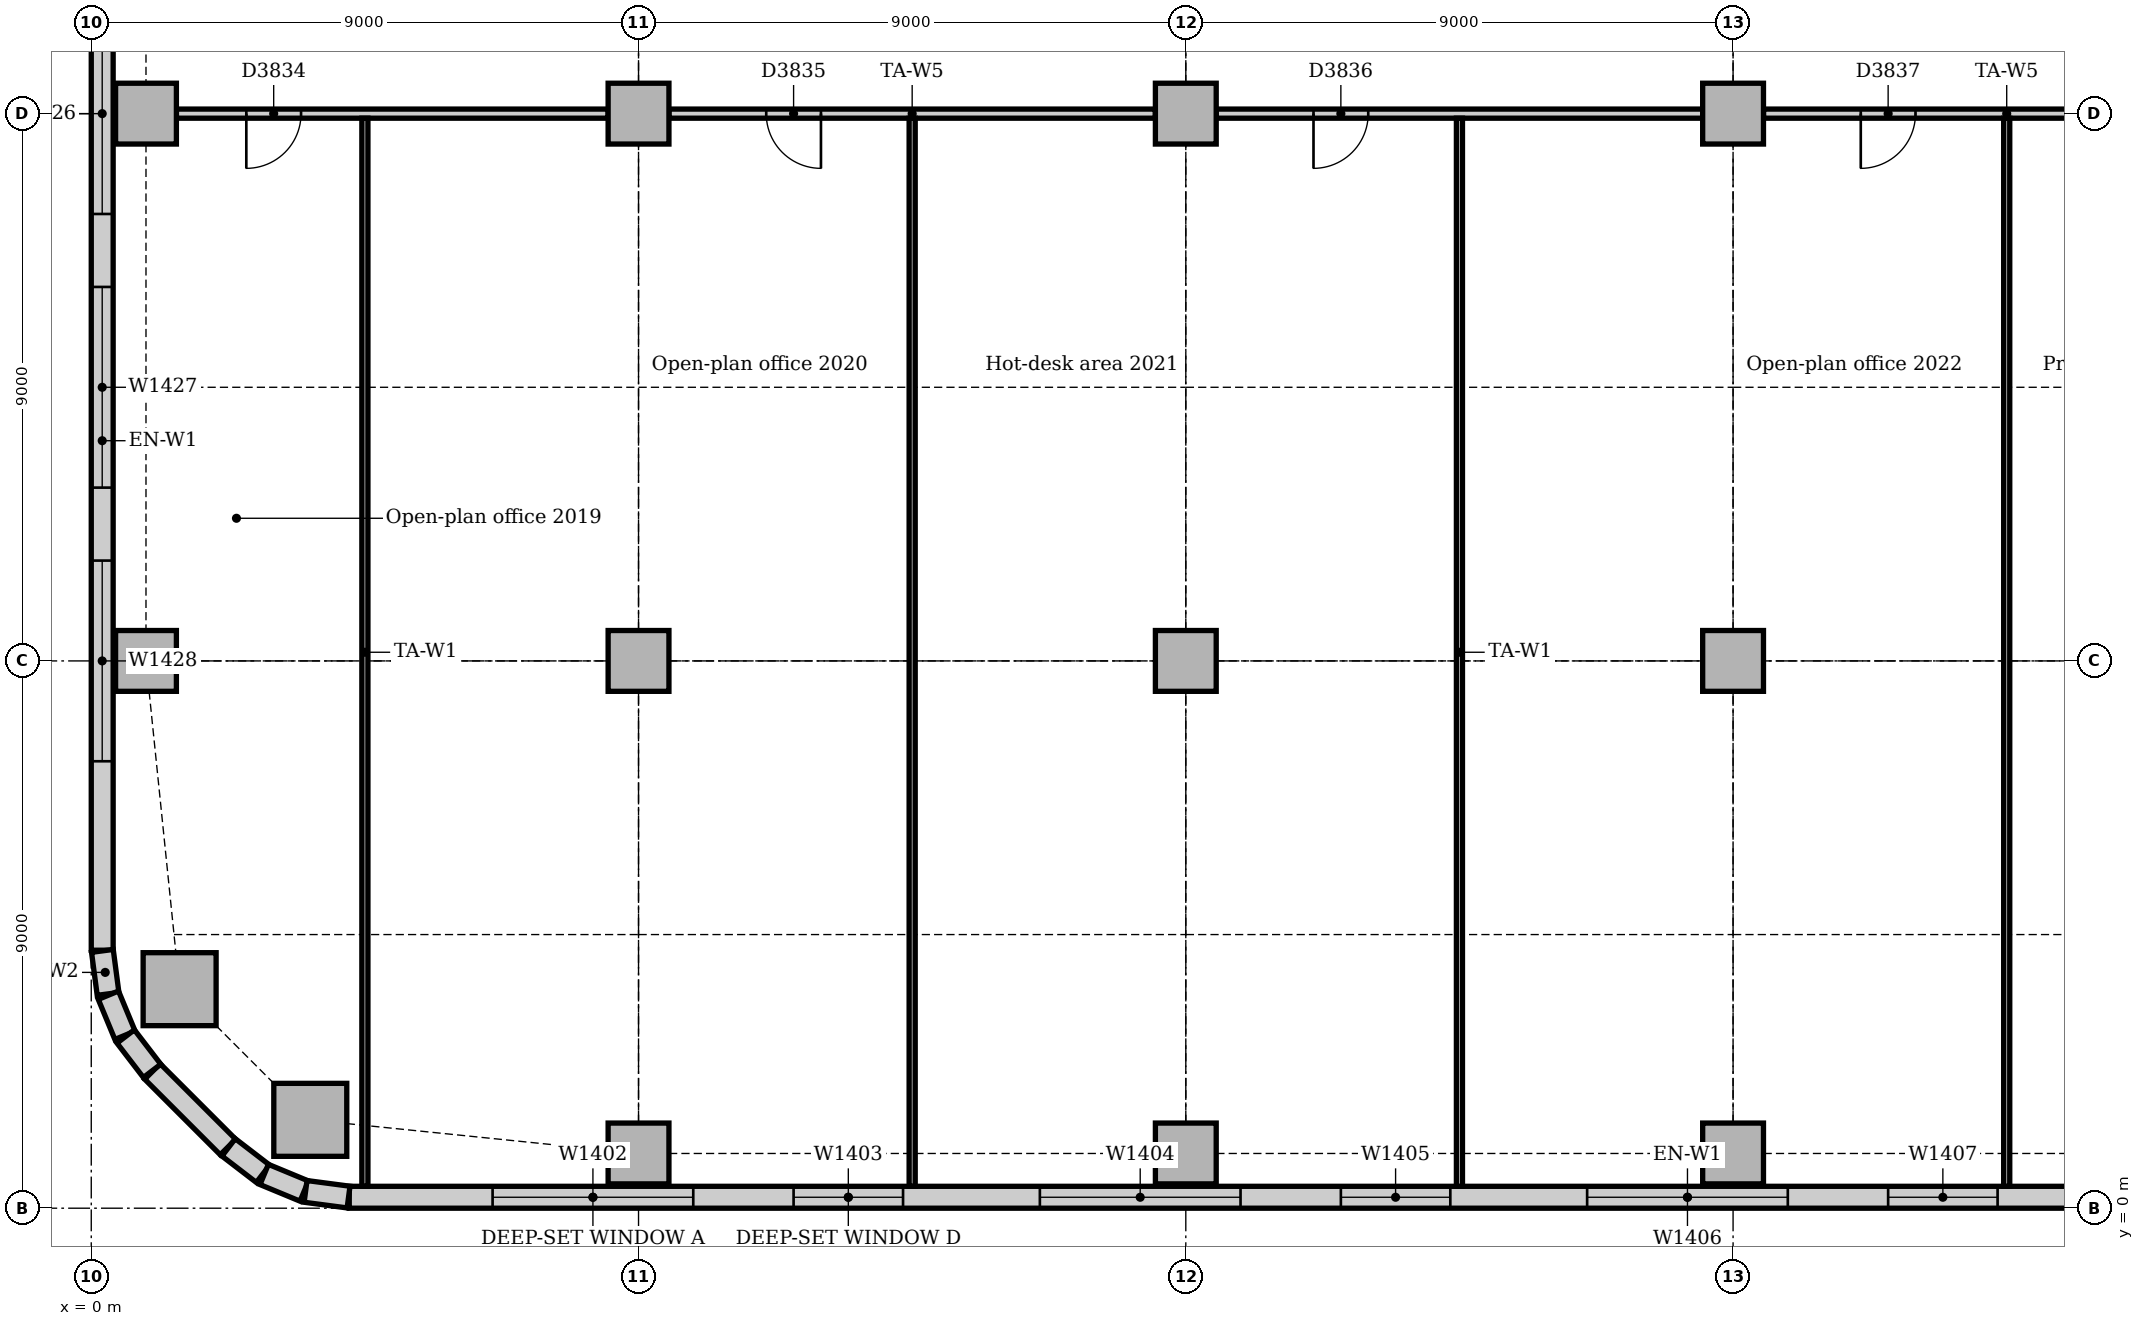
"""IFC4 building model, lengths in metres.
Left out: names, types, materials, properties, quantities, classifications, styles, units other than length and angle.
Written with IfcOpenShell. Run it as: python <this file> out.ifc"""

import sys

from ifc_helpers import new_model, si_unit, direction, frame, frame_2d, origin, origin_2d, place, context, subcontext, project, spatial, rectangle, extrude, element, fill, save


model = new_model("IFC4")
c1 = context("Model", 3, precision=1e-05, world=origin(), true_north=direction((0.0, 1.0)))
c2 = subcontext(c1, "Body", "Model", "MODEL_VIEW")
j1 = project(units=[si_unit("LENGTHUNIT", "METRE"), si_unit("PLANEANGLEUNIT", "RADIAN")], contexts=[c1])
p1 = place(None, origin())
s1 = spatial("IfcSite", under=j1, at=p1, CompositionType="ELEMENT")
p2 = place(p1, origin())
s2 = spatial("IfcBuilding", under=s1, at=p2, CompositionType="ELEMENT")
p3 = place(p2, frame((0.0, 0.0, 87.0)))
s3 = spatial("IfcBuildingStorey", under=s2, at=p3, CompositionType="ELEMENT", Elevation=87.0)
for number, where, z_axis, x_axis in (
    (1, (3.602, 1.453, 0.0), (0.0, 0.0, 1.0), (1.0, 0.0, 0.0)),
    (2, (1.453, 3.602, 0.0), (0.0, 0.0, 1.0), (1.0, 0.0, 0.0)),
):
    element("IfcColumn", number, at=place(p3, frame(where, z_axis=z_axis, x_axis=x_axis)), inside=s3, PredefinedType="COLUMN", context=c2, shape_type="SweptSolid", body=[
        extrude(rectangle(XDim=1.2, YDim=1.2, at=origin_2d()), origin(), (0.0, 0.0, 1.0), 3.85),
    ])
for number, where, z_axis, x_axis in (
    (3, (9.0, 0.9, 0.0), (0.0, 0.0, 1.0), (1.0, 0.0, 0.0)),
    (4, (18.0, 0.9, 0.0), (0.0, 0.0, 1.0), (1.0, 0.0, 0.0)),
    (5, (27.0, 0.9, 0.0), (0.0, 0.0, 1.0), (1.0, 0.0, 0.0)),
    (6, (0.9, 9.0, 0.0), (0.0, 0.0, 1.0), (1.0, 0.0, 0.0)),
    (7, (0.9, 18.0, 0.0), (0.0, 0.0, 1.0), (1.0, 0.0, 0.0)),
    (8, (9.0, 9.0, 0.0), (0.0, 0.0, 1.0), (1.0, 0.0, 0.0)),
    (9, (9.0, 18.0, 0.0), (0.0, 0.0, 1.0), (1.0, 0.0, 0.0)),
    (10, (18.0, 9.0, 0.0), (0.0, 0.0, 1.0), (1.0, 0.0, 0.0)),
    (11, (18.0, 18.0, 0.0), (0.0, 0.0, 1.0), (1.0, 0.0, 0.0)),
    (12, (27.0, 9.0, 0.0), (0.0, 0.0, 1.0), (1.0, 0.0, 0.0)),
    (13, (27.0, 18.0, 0.0), (0.0, 0.0, 1.0), (1.0, 0.0, 0.0)),
):
    element("IfcColumn", number, at=place(p3, frame(where, z_axis=z_axis, x_axis=x_axis)), inside=s3, PredefinedType="COLUMN", context=c2, shape_type="SweptSolid", body=[
        extrude(rectangle(XDim=1.0, YDim=1.0, at=origin_2d()), origin(), (0.0, 0.0, 1.0), 3.85),
    ])
p4 = place(p3, frame((4.243, 0.18, 0.0), z_axis=(0.0, 0.0, 1.0), x_axis=(1.0, 0.0, 0.0)))
e14 = element("IfcWall", 14, at=p4, inside=s3, PredefinedType="STANDARD", context=c2, shape_type="SweptSolid", body=[
    extrude(rectangle(XDim=44.015, YDim=0.36, at=frame_2d((22.007, 0.0))), origin(), (0.0, 0.0, 1.0), 3.85),
])
p5 = place(p4, frame((2.357, 0.0, 0.9)))
e15 = element("IfcOpeningElement", 15, at=p5, cuts=e14, PredefinedType="OPENING", context=c2, shape_type="SweptSolid", body=[
    extrude(rectangle(XDim=3.3, YDim=1.6, at=frame_2d((1.65, 0.8))), frame((0.0, 0.19, 0.0), z_axis=(0.0, -1.0, 0.0), x_axis=(1.0, 0.0, 0.0)), (0.0, 0.0, 1.0), 0.38),
])
p6 = place(p4, frame((7.307, 0.0, 0.9)))
e16 = element("IfcOpeningElement", 16, at=p6, cuts=e14, PredefinedType="OPENING", context=c2, shape_type="SweptSolid", body=[
    extrude(rectangle(XDim=1.8, YDim=1.6, at=frame_2d((0.9, 0.8))), frame((0.0, 0.19, 0.0), z_axis=(0.0, -1.0, 0.0), x_axis=(1.0, 0.0, 0.0)), (0.0, 0.0, 1.0), 0.38),
])
p7 = place(p4, frame((11.357, 0.0, 0.9)))
e17 = element("IfcOpeningElement", 17, at=p7, cuts=e14, PredefinedType="OPENING", context=c2, shape_type="SweptSolid", body=[
    extrude(rectangle(XDim=3.3, YDim=1.6, at=frame_2d((1.65, 0.8))), frame((0.0, 0.19, 0.0), z_axis=(0.0, -1.0, 0.0), x_axis=(1.0, 0.0, 0.0)), (0.0, 0.0, 1.0), 0.38),
])
p8 = place(p4, frame((16.307, 0.0, 0.9)))
e18 = element("IfcOpeningElement", 18, at=p8, cuts=e14, PredefinedType="OPENING", context=c2, shape_type="SweptSolid", body=[
    extrude(rectangle(XDim=1.8, YDim=1.6, at=frame_2d((0.9, 0.8))), frame((0.0, 0.19, 0.0), z_axis=(0.0, -1.0, 0.0), x_axis=(1.0, 0.0, 0.0)), (0.0, 0.0, 1.0), 0.38),
])
p9 = place(p4, frame((20.357, 0.0, 0.9)))
e19 = element("IfcOpeningElement", 19, at=p9, cuts=e14, PredefinedType="OPENING", context=c2, shape_type="SweptSolid", body=[
    extrude(rectangle(XDim=3.3, YDim=1.6, at=frame_2d((1.65, 0.8))), frame((0.0, 0.19, 0.0), z_axis=(0.0, -1.0, 0.0), x_axis=(1.0, 0.0, 0.0)), (0.0, 0.0, 1.0), 0.38),
])
p10 = place(p4, frame((25.307, 0.0, 0.9)))
e20 = element("IfcOpeningElement", 20, at=p10, cuts=e14, PredefinedType="OPENING", context=c2, shape_type="SweptSolid", body=[
    extrude(rectangle(XDim=1.8, YDim=1.6, at=frame_2d((0.9, 0.8))), frame((0.0, 0.19, 0.0), z_axis=(0.0, -1.0, 0.0), x_axis=(1.0, 0.0, 0.0)), (0.0, 0.0, 1.0), 0.38),
])
p11 = place(p4, frame((29.357, 0.0, 0.9)))
e21 = element("IfcOpeningElement", 21, at=p11, cuts=e14, PredefinedType="OPENING", context=c2, shape_type="SweptSolid", body=[
    extrude(rectangle(XDim=3.3, YDim=1.6, at=frame_2d((1.65, 0.8))), frame((0.0, 0.19, 0.0), z_axis=(0.0, -1.0, 0.0), x_axis=(1.0, 0.0, 0.0)), (0.0, 0.0, 1.0), 0.38),
])
p12 = place(p4, frame((34.307, 0.0, 0.9)))
e22 = element("IfcOpeningElement", 22, at=p12, cuts=e14, PredefinedType="OPENING", context=c2, shape_type="SweptSolid", body=[
    extrude(rectangle(XDim=1.8, YDim=1.6, at=frame_2d((0.9, 0.8))), frame((0.0, 0.19, 0.0), z_axis=(0.0, -1.0, 0.0), x_axis=(1.0, 0.0, 0.0)), (0.0, 0.0, 1.0), 0.38),
])
p13 = place(p4, frame((38.357, 0.0, 0.9)))
e23 = element("IfcOpeningElement", 23, at=p13, cuts=e14, PredefinedType="OPENING", context=c2, shape_type="SweptSolid", body=[
    extrude(rectangle(XDim=3.3, YDim=1.6, at=frame_2d((1.65, 0.8))), frame((0.0, 0.19, 0.0), z_axis=(0.0, -1.0, 0.0), x_axis=(1.0, 0.0, 0.0)), (0.0, 0.0, 1.0), 0.38),
])
p14 = place(p3, frame((0.18, 21.0, 0.0), z_axis=(0.0, 0.0, 1.0), x_axis=(0.0, -1.0, 0.0)))
e24 = element("IfcWall", 24, at=p14, inside=s3, PredefinedType="STANDARD", context=c2, shape_type="SweptSolid", body=[
    extrude(rectangle(XDim=16.757, YDim=0.36, at=frame_2d((8.379, 0.0))), origin(), (0.0, 0.0, 1.0), 3.85),
])
p15 = place(p14, frame((1.35, 0.0, 0.9)))
e25 = element("IfcOpeningElement", 25, at=p15, cuts=e24, PredefinedType="OPENING", context=c2, shape_type="SweptSolid", body=[
    extrude(rectangle(XDim=3.3, YDim=1.6, at=frame_2d((1.65, 0.8))), frame((0.0, 0.19, 0.0), z_axis=(0.0, -1.0, 0.0), x_axis=(1.0, 0.0, 0.0)), (0.0, 0.0, 1.0), 0.38),
])
p16 = place(p14, frame((5.85, 0.0, 0.9)))
e26 = element("IfcOpeningElement", 26, at=p16, cuts=e24, PredefinedType="OPENING", context=c2, shape_type="SweptSolid", body=[
    extrude(rectangle(XDim=3.3, YDim=1.6, at=frame_2d((1.65, 0.8))), frame((0.0, 0.19, 0.0), z_axis=(0.0, -1.0, 0.0), x_axis=(1.0, 0.0, 0.0)), (0.0, 0.0, 1.0), 0.38),
])
p17 = place(p14, frame((10.35, 0.0, 0.9)))
e27 = element("IfcOpeningElement", 27, at=p17, cuts=e24, PredefinedType="OPENING", context=c2, shape_type="SweptSolid", body=[
    extrude(rectangle(XDim=3.3, YDim=1.6, at=frame_2d((1.65, 0.8))), frame((0.0, 0.19, 0.0), z_axis=(0.0, -1.0, 0.0), x_axis=(1.0, 0.0, 0.0)), (0.0, 0.0, 1.0), 0.38),
])
p18 = place(p3, frame((1.006, 2.249, 0.0), z_axis=(0.0, 0.0, 1.0), x_axis=(0.707106781187, -0.707106781187, 0.0)))
e28 = element("IfcWall", 28, at=p18, inside=s3, PredefinedType="STANDARD", context=c2, shape_type="SweptSolid", body=[
    extrude(rectangle(XDim=1.757, YDim=0.36, at=frame_2d((0.879, 0.0))), origin(), (0.0, 0.0, 1.0), 3.85),
])
for number, where, z_axis, x_axis in (
    (29, (0.183, 4.231, 0.0), (0.0, 0.0, 1.0), (0.131, -0.991, 0.0)),
    (30, (0.282, 3.503, 0.0), (0.0, 0.0, 1.0), (0.383, -0.924, 0.0)),
):
    element("IfcWall", number, at=place(p3, frame(where, z_axis=z_axis, x_axis=x_axis)), inside=s3, PredefinedType="STANDARD", context=c2, shape_type="SweptSolid", body=[
        extrude(rectangle(XDim=0.713, YDim=0.36, at=frame_2d((0.356, 0.0))), origin(), (0.0, 0.0, 1.0), 3.85),
    ])
for number, where, z_axis, x_axis in (
    (31, (0.566, 2.825, 0.0), (0.0, 0.0, 1.0), (0.609, -0.793, 0.0)),
    (32, (2.259, 1.0, 0.0), (0.0, 0.0, 1.0), (0.793, -0.609, 0.0)),
):
    element("IfcWall", number, at=place(p3, frame(where, z_axis=z_axis, x_axis=x_axis)), inside=s3, PredefinedType="STANDARD", context=c2, shape_type="SweptSolid", body=[
        extrude(rectangle(XDim=0.713, YDim=0.36, at=frame_2d((0.357, 0.0))), origin(), (0.0, 0.0, 1.0), 3.85),
    ])
for number, where, z_axis, x_axis in (
    (33, (2.844, 0.555, 0.0), (0.0, 0.0, 1.0), (0.924, -0.383, 0.0)),
    (34, (3.524, 0.276, 0.0), (0.0, 0.0, 1.0), (0.991, -0.131, 0.0)),
):
    element("IfcWall", number, at=place(p3, frame(where, z_axis=z_axis, x_axis=x_axis)), inside=s3, PredefinedType="STANDARD", context=c2, shape_type="SweptSolid", body=[
        extrude(rectangle(XDim=0.713, YDim=0.36, at=frame_2d((0.356, 0.0))), origin(), (0.0, 0.0, 1.0), 3.85),
    ])
p19 = place(p3, frame((27.5, 18.0, 0.0), z_axis=(0.0, 0.0, 1.0), x_axis=(1.0, 0.0, 0.0)))
e35 = element("IfcWall", 35, at=p19, inside=s3, PredefinedType="PARTITIONING", context=c2, shape_type="SweptSolid", body=[
    extrude(rectangle(XDim=8.0, YDim=0.15, at=frame_2d((4.0, 0.0))), origin(), (0.0, 0.0, 1.0), 3.15),
])
p20 = place(p19, frame((1.6, 0.0, 0.0)))
e36 = element("IfcOpeningElement", 36, at=p20, cuts=e35, PredefinedType="OPENING", context=c2, shape_type="SweptSolid", body=[
    extrude(rectangle(XDim=0.9, YDim=2.1, at=frame_2d((0.45, 1.05))), frame((0.0, 0.085, 0.0), z_axis=(0.0, -1.0, 0.0), x_axis=(1.0, 0.0, 0.0)), (0.0, 0.0, 1.0), 0.17),
])
p21 = place(p3, frame((18.5, 18.0, 0.0), z_axis=(0.0, 0.0, 1.0), x_axis=(1.0, 0.0, 0.0)))
e37 = element("IfcWall", 37, at=p21, inside=s3, PredefinedType="PARTITIONING", context=c2, shape_type="SweptSolid", body=[
    extrude(rectangle(XDim=8.0, YDim=0.15, at=frame_2d((4.0, 0.0))), origin(), (0.0, 0.0, 1.0), 3.15),
])
p22 = place(p21, frame((1.6, 0.0, 0.0)))
e38 = element("IfcOpeningElement", 38, at=p22, cuts=e37, PredefinedType="OPENING", context=c2, shape_type="SweptSolid", body=[
    extrude(rectangle(XDim=0.9, YDim=2.1, at=frame_2d((0.45, 1.05))), frame((0.0, 0.085, 0.0), z_axis=(0.0, -1.0, 0.0), x_axis=(1.0, 0.0, 0.0)), (0.0, 0.0, 1.0), 0.17),
])
p23 = place(p3, frame((9.5, 18.0, 0.0), z_axis=(0.0, 0.0, 1.0), x_axis=(1.0, 0.0, 0.0)))
e39 = element("IfcWall", 39, at=p23, inside=s3, PredefinedType="PARTITIONING", context=c2, shape_type="SweptSolid", body=[
    extrude(rectangle(XDim=8.0, YDim=0.15, at=frame_2d((4.0, 0.0))), origin(), (0.0, 0.0, 1.0), 3.15),
])
p24 = place(p23, frame((1.6, 0.0, 0.0)))
e40 = element("IfcOpeningElement", 40, at=p24, cuts=e39, PredefinedType="OPENING", context=c2, shape_type="SweptSolid", body=[
    extrude(rectangle(XDim=0.9, YDim=2.1, at=frame_2d((0.45, 1.05))), frame((0.0, 0.085, 0.0), z_axis=(0.0, -1.0, 0.0), x_axis=(1.0, 0.0, 0.0)), (0.0, 0.0, 1.0), 0.17),
])
p25 = place(p3, frame((1.4, 18.0, 0.0), z_axis=(0.0, 0.0, 1.0), x_axis=(1.0, 0.0, 0.0)))
e41 = element("IfcWall", 41, at=p25, inside=s3, PredefinedType="PARTITIONING", context=c2, shape_type="SweptSolid", body=[
    extrude(rectangle(XDim=7.1, YDim=0.15, at=frame_2d((3.55, 0.0))), origin(), (0.0, 0.0, 1.0), 3.15),
])
p26 = place(p25, frame((1.15, 0.0, 0.0)))
e42 = element("IfcOpeningElement", 42, at=p26, cuts=e41, PredefinedType="OPENING", context=c2, shape_type="SweptSolid", body=[
    extrude(rectangle(XDim=0.9, YDim=2.1, at=frame_2d((0.45, 1.05))), frame((0.0, 0.085, 0.0), z_axis=(0.0, -1.0, 0.0), x_axis=(1.0, 0.0, 0.0)), (0.0, 0.0, 1.0), 0.17),
])
for number, where, z_axis, x_axis in (
    (43, (4.5, 0.36, 0.0), (0.0, 0.0, 1.0), (0.0, 1.0, 0.0)),
    (44, (13.5, 0.36, 0.0), (0.0, 0.0, 1.0), (0.0, 1.0, 0.0)),
    (45, (22.5, 0.36, 0.0), (0.0, 0.0, 1.0), (0.0, 1.0, 0.0)),
    (46, (31.5, 0.36, 0.0), (0.0, 0.0, 1.0), (0.0, 1.0, 0.0)),
):
    element("IfcWall", number, at=place(p3, frame(where, z_axis=z_axis, x_axis=x_axis)), inside=s3, PredefinedType="PARTITIONING", context=c2, shape_type="SweptSolid", body=[
        extrude(rectangle(XDim=17.565, YDim=0.1, at=frame_2d((8.783, 0.0))), origin(), (0.0, 0.0, 1.0), 3.85),
    ])
p27 = place(p5, origin())
e47 = element("IfcWindow", 47, at=p27, inside=s3, PartitioningType="SINGLE_PANEL", PredefinedType="WINDOW", context=c2, shape_type="SweptSolid", body=[
    extrude(rectangle(XDim=3.3, YDim=1.6, at=frame_2d((1.65, 0.8))), frame((0.0, 0.13, 0.0), z_axis=(0.0, -1.0, 0.0), x_axis=(1.0, 0.0, 0.0)), (0.0, 0.0, 1.0), 0.06),
])
fill(e15, e47)
p28 = place(p6, origin())
e48 = element("IfcWindow", 48, at=p28, inside=s3, PartitioningType="SINGLE_PANEL", PredefinedType="WINDOW", context=c2, shape_type="SweptSolid", body=[
    extrude(rectangle(XDim=1.8, YDim=1.6, at=frame_2d((0.9, 0.8))), frame((0.0, 0.13, 0.0), z_axis=(0.0, -1.0, 0.0), x_axis=(1.0, 0.0, 0.0)), (0.0, 0.0, 1.0), 0.06),
])
fill(e16, e48)
p29 = place(p7, origin())
e49 = element("IfcWindow", 49, at=p29, inside=s3, PartitioningType="SINGLE_PANEL", PredefinedType="WINDOW", context=c2, shape_type="SweptSolid", body=[
    extrude(rectangle(XDim=3.3, YDim=1.6, at=frame_2d((1.65, 0.8))), frame((0.0, 0.13, 0.0), z_axis=(0.0, -1.0, 0.0), x_axis=(1.0, 0.0, 0.0)), (0.0, 0.0, 1.0), 0.06),
])
fill(e17, e49)
p30 = place(p8, origin())
e50 = element("IfcWindow", 50, at=p30, inside=s3, PartitioningType="SINGLE_PANEL", PredefinedType="WINDOW", context=c2, shape_type="SweptSolid", body=[
    extrude(rectangle(XDim=1.8, YDim=1.6, at=frame_2d((0.9, 0.8))), frame((0.0, 0.13, 0.0), z_axis=(0.0, -1.0, 0.0), x_axis=(1.0, 0.0, 0.0)), (0.0, 0.0, 1.0), 0.06),
])
fill(e18, e50)
p31 = place(p9, origin())
e51 = element("IfcWindow", 51, at=p31, inside=s3, PartitioningType="SINGLE_PANEL", PredefinedType="WINDOW", context=c2, shape_type="SweptSolid", body=[
    extrude(rectangle(XDim=3.3, YDim=1.6, at=frame_2d((1.65, 0.8))), frame((0.0, 0.13, 0.0), z_axis=(0.0, -1.0, 0.0), x_axis=(1.0, 0.0, 0.0)), (0.0, 0.0, 1.0), 0.06),
])
fill(e19, e51)
p32 = place(p10, origin())
e52 = element("IfcWindow", 52, at=p32, inside=s3, PartitioningType="SINGLE_PANEL", PredefinedType="WINDOW", context=c2, shape_type="SweptSolid", body=[
    extrude(rectangle(XDim=1.8, YDim=1.6, at=frame_2d((0.9, 0.8))), frame((0.0, 0.13, 0.0), z_axis=(0.0, -1.0, 0.0), x_axis=(1.0, 0.0, 0.0)), (0.0, 0.0, 1.0), 0.06),
])
fill(e20, e52)
p33 = place(p15, origin())
e53 = element("IfcWindow", 53, at=p33, inside=s3, PartitioningType="SINGLE_PANEL", PredefinedType="WINDOW", context=c2, shape_type="SweptSolid", body=[
    extrude(rectangle(XDim=3.3, YDim=1.6, at=frame_2d((1.65, 0.8))), frame((0.0, 0.13, 0.0), z_axis=(0.0, -1.0, 0.0), x_axis=(1.0, 0.0, 0.0)), (0.0, 0.0, 1.0), 0.06),
])
fill(e25, e53)
p34 = place(p16, origin())
e54 = element("IfcWindow", 54, at=p34, inside=s3, PartitioningType="SINGLE_PANEL", PredefinedType="WINDOW", context=c2, shape_type="SweptSolid", body=[
    extrude(rectangle(XDim=3.3, YDim=1.6, at=frame_2d((1.65, 0.8))), frame((0.0, 0.13, 0.0), z_axis=(0.0, -1.0, 0.0), x_axis=(1.0, 0.0, 0.0)), (0.0, 0.0, 1.0), 0.06),
])
fill(e26, e54)
p35 = place(p17, origin())
e55 = element("IfcWindow", 55, at=p35, inside=s3, PartitioningType="SINGLE_PANEL", PredefinedType="WINDOW", context=c2, shape_type="SweptSolid", body=[
    extrude(rectangle(XDim=3.3, YDim=1.6, at=frame_2d((1.65, 0.8))), frame((0.0, 0.13, 0.0), z_axis=(0.0, -1.0, 0.0), x_axis=(1.0, 0.0, 0.0)), (0.0, 0.0, 1.0), 0.06),
])
fill(e27, e55)
p36 = place(p26, frame((0.9, 0.0, 0.0), z_axis=(0.0, 0.0, 1.0), x_axis=(-1.0, 0.0, 0.0)))
e56 = element("IfcDoor", 56, at=p36, inside=s3, OperationType="SINGLE_SWING_RIGHT", PredefinedType="DOOR", context=c2, shape_type="SweptSolid", body=[
    extrude(rectangle(XDim=0.9, YDim=2.1, at=frame_2d((0.45, 1.05))), frame((0.0, 0.025, 0.0), z_axis=(0.0, -1.0, 0.0), x_axis=(1.0, 0.0, 0.0)), (0.0, 0.0, 1.0), 0.05),
])
fill(e42, e56)
p37 = place(p24, frame((0.9, 0.0, 0.0), z_axis=(0.0, 0.0, 1.0), x_axis=(-1.0, 0.0, 0.0)))
e57 = element("IfcDoor", 57, at=p37, inside=s3, OperationType="SINGLE_SWING_LEFT", PredefinedType="DOOR", context=c2, shape_type="SweptSolid", body=[
    extrude(rectangle(XDim=0.9, YDim=2.1, at=frame_2d((0.45, 1.05))), frame((0.0, 0.025, 0.0), z_axis=(0.0, -1.0, 0.0), x_axis=(1.0, 0.0, 0.0)), (0.0, 0.0, 1.0), 0.05),
])
fill(e40, e57)
p38 = place(p22, frame((0.9, 0.0, 0.0), z_axis=(0.0, 0.0, 1.0), x_axis=(-1.0, 0.0, 0.0)))
e58 = element("IfcDoor", 58, at=p38, inside=s3, OperationType="SINGLE_SWING_RIGHT", PredefinedType="DOOR", context=c2, shape_type="SweptSolid", body=[
    extrude(rectangle(XDim=0.9, YDim=2.1, at=frame_2d((0.45, 1.05))), frame((0.0, 0.025, 0.0), z_axis=(0.0, -1.0, 0.0), x_axis=(1.0, 0.0, 0.0)), (0.0, 0.0, 1.0), 0.05),
])
fill(e38, e58)
p39 = place(p20, frame((0.9, 0.0, 0.0), z_axis=(0.0, 0.0, 1.0), x_axis=(-1.0, 0.0, 0.0)))
e59 = element("IfcDoor", 59, at=p39, inside=s3, OperationType="SINGLE_SWING_RIGHT", PredefinedType="DOOR", context=c2, shape_type="SweptSolid", body=[
    extrude(rectangle(XDim=0.9, YDim=2.1, at=frame_2d((0.45, 1.05))), frame((0.0, 0.025, 0.0), z_axis=(0.0, -1.0, 0.0), x_axis=(1.0, 0.0, 0.0)), (0.0, 0.0, 1.0), 0.05),
])
fill(e36, e59)
save(model, sys.argv[1])
